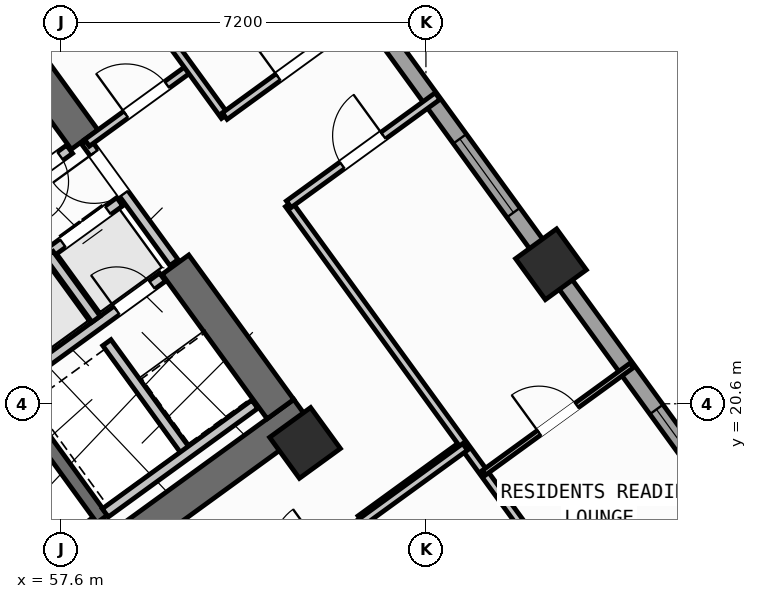
"""IFC4 building model, lengths in metres.
Left out: names, types, materials, properties, quantities, classifications, styles, units other than length and angle.
Written with IfcOpenShell. Run it as: python <this file> out.ifc"""

import sys

from ifc_helpers import new_model, si_unit, direction, frame, frame_2d, origin, origin_2d, place, context, subcontext, project, spatial, rectangle, hollow_rectangle, extrude, source, transform, mapped, element, fill, save


model = new_model("IFC4")
c1 = context("Model", 3, precision=1e-05, world=origin(), true_north=direction((0.0, 1.0)))
c2 = subcontext(c1, "Body", "Model", "MODEL_VIEW")
j1 = project(units=[si_unit("LENGTHUNIT", "METRE"), si_unit("PLANEANGLEUNIT", "RADIAN")], contexts=[c1])
p1 = place(None, origin())
s1 = spatial("IfcSite", under=j1, at=p1, CompositionType="ELEMENT")
p2 = place(p1, origin())
s2 = spatial("IfcBuilding", under=s1, at=p2, CompositionType="ELEMENT")
p3 = place(p2, frame((0.0, 0.0, 31.2)))
s3 = spatial("IfcBuildingStorey", under=s2, at=p3, CompositionType="ELEMENT", Elevation=31.2)
p4 = place(p3, frame((52.318, 13.11, 0.0), z_axis=(0.0, 0.0, 1.0), x_axis=(0.809019445368, 0.587781878776, 0.0)))
e1 = element("IfcWall", 1, at=p4, inside=s3, PredefinedType="SHEAR", context=c2, shape_type="SweptSolid", body=[
    extrude(rectangle(XDim=12.44, YDim=0.65, at=frame_2d((6.22, 0.0))), origin(), (0.0, 0.0, 1.0), 3.35),
])
p5 = place(p3, frame((61.929, 20.494, 0.0), z_axis=(0.0, 0.0, 1.0), x_axis=(-0.58782982593, 0.808984607855, 0.0)))
e2 = element("IfcWall", 2, at=p5, inside=s3, PredefinedType="SHEAR", context=c2, shape_type="SweptSolid", body=[
    extrude(rectangle(XDim=3.525, YDim=0.65, at=frame_2d((1.762, 0.0))), origin(), (0.0, 0.0, 1.0), 3.35),
])
p6 = place(p3, frame((58.064, 25.813, 0.0), z_axis=(0.0, 0.0, 1.0), x_axis=(-0.58777996584, 0.809020835181, 0.0)))
e3 = element("IfcWall", 3, at=p6, inside=s3, PredefinedType="SHEAR", context=c2, shape_type="SweptSolid", body=[
    extrude(rectangle(XDim=6.375, YDim=0.65, at=frame_2d((3.188, 0.0))), origin(), (0.0, 0.0, 1.0), 3.35),
])
m1 = source(origin(), c2, "Body", "SweptSolid", [
    extrude(hollow_rectangle(XDim=1.0, YDim=1.0, WallThickness=0.04, at=origin_2d()), origin(), (0.0, 0.0, 1.0), 3.6),
])
for number, where, z_axis, x_axis in (
    (4, (62.414, 19.827, 0.0), (0.0, 0.0, 1.0), (0.809, 0.588, 0.0)),
    (5, (67.268, 23.354, 0.0), (0.0, 0.0, 1.0), (0.809, 0.588, 0.0)),
):
    element("IfcColumn", number, at=place(p3, frame(where, z_axis=z_axis, x_axis=x_axis)), inside=s3, PredefinedType="COLUMN", context=c2, shape_type="MappedRepresentation", body=[
        mapped(m1, transform((0.0, 0.0, 0.0), scale=1.0)),
    ])
p7 = place(p3, frame((43.938, 25.192, 0.0), z_axis=(0.0, 0.0, 1.0), x_axis=(0.809016324578, 0.587786174187, 0.0)))
e6 = element("IfcWall", 6, at=p7, inside=s3, PredefinedType="STANDARD", context=c2, shape_type="SweptSolid", body=[
    extrude(rectangle(XDim=17.587, YDim=0.32, at=frame_2d((8.794, 0.0))), origin(), (0.0, 0.0, 1.0), 3.35),
])
p8 = place(p7, frame((14.914, 0.0, 0.0)))
e7 = element("IfcOpeningElement", 7, at=p8, cuts=e6, PredefinedType="OPENING", context=c2, shape_type="SweptSolid", body=[
    extrude(rectangle(XDim=1.05, YDim=2.15, at=frame_2d((0.525, 1.075))), frame((0.0, 0.17, 0.0), z_axis=(0.0, -1.0, 0.0), x_axis=(1.0, 0.0, 0.0)), (0.0, 0.0, 1.0), 0.34),
])
p9 = place(p7, frame((2.169, 0.0, 0.8)))
e8 = element("IfcOpeningElement", 8, at=p9, cuts=e6, PredefinedType="OPENING", context=c2, shape_type="SweptSolid", body=[
    extrude(rectangle(XDim=2.1, YDim=1.55, at=frame_2d((1.05, 0.775))), frame((0.0, 0.17, 0.0), z_axis=(0.0, -1.0, 0.0), x_axis=(1.0, 0.0, 0.0)), (0.0, 0.0, 1.0), 0.34),
])
p10 = place(p7, frame((7.319, 0.0, 0.8)))
e9 = element("IfcOpeningElement", 9, at=p10, cuts=e6, PredefinedType="OPENING", context=c2, shape_type="SweptSolid", body=[
    extrude(rectangle(XDim=2.1, YDim=1.55, at=frame_2d((1.05, 0.775))), frame((0.0, 0.17, 0.0), z_axis=(0.0, -1.0, 0.0), x_axis=(1.0, 0.0, 0.0)), (0.0, 0.0, 1.0), 0.34),
])
p11 = place(p3, frame((58.455, 35.484, 0.0), z_axis=(0.0, 0.0, 1.0), x_axis=(0.587783625747, -0.809018176127, 0.0)))
e10 = element("IfcWall", 10, at=p11, inside=s3, PredefinedType="STANDARD", context=c2, shape_type="SweptSolid", body=[
    extrude(rectangle(XDim=21.587, YDim=0.32, at=frame_2d((10.794, 0.0))), origin(), (0.0, 0.0, 1.0), 2.725),
])
p12 = place(p11, frame((2.994, 0.0, 0.8)))
e11 = element("IfcOpeningElement", 11, at=p12, cuts=e10, PredefinedType="OPENING", context=c2, shape_type="SweptSolid", body=[
    extrude(rectangle(XDim=2.1, YDim=1.55, at=frame_2d((1.05, 0.775))), frame((0.0, 0.17, 0.0), z_axis=(0.0, -1.0, 0.0), x_axis=(1.0, 0.0, 0.0)), (0.0, 0.0, 1.0), 0.34),
])
p13 = place(p11, frame((11.934, 0.0, 0.85)))
e12 = element("IfcOpeningElement", 12, at=p13, cuts=e10, PredefinedType="OPENING", context=c2, shape_type="SweptSolid", body=[
    extrude(rectangle(XDim=1.8, YDim=1.5, at=frame_2d((0.9, 0.75))), frame((0.0, 0.17, 0.0), z_axis=(0.0, -1.0, 0.0), x_axis=(1.0, 0.0, 0.0)), (0.0, 0.0, 1.0), 0.34),
])
p14 = place(p11, frame((18.535, 0.0, 0.85)))
e13 = element("IfcOpeningElement", 13, at=p14, cuts=e10, PredefinedType="OPENING", context=c2, shape_type="SweptSolid", body=[
    extrude(rectangle(XDim=1.5, YDim=1.5, at=frame_2d((0.75, 0.75))), frame((0.0, 0.17, 0.0), z_axis=(0.0, -1.0, 0.0), x_axis=(1.0, 0.0, 0.0)), (0.0, 0.0, 1.0), 0.34),
])
p15 = place(p3, frame((52.472, 14.013, 0.0), z_axis=(0.0, 0.0, 1.0), x_axis=(0.809028366311, 0.587769599847, 0.0)))
e14 = element("IfcWall", 14, at=p15, inside=s3, PredefinedType="SHEAR", context=c2, shape_type="SweptSolid", body=[
    extrude(rectangle(XDim=7.33, YDim=0.26, at=frame_2d((3.665, 0.0))), origin(), (0.0, 0.0, 1.0), 3.35),
])
p16 = place(p3, frame((58.41, 18.327, 0.0), z_axis=(0.0, 0.0, 1.0), x_axis=(-0.58776738483, 0.809029975545, 0.0)))
e15 = element("IfcWall", 15, at=p16, inside=s3, PredefinedType="SHEAR", context=c2, shape_type="SweptSolid", body=[
    extrude(rectangle(XDim=3.16, YDim=0.26, at=frame_2d((1.58, 0.0))), origin(), (0.0, 0.0, 1.0), 3.35),
])
p17 = place(p3, frame((56.553, 20.884, 0.0), z_axis=(0.0, 0.0, 1.0), x_axis=(0.809035789462, 0.587759382205, 0.0)))
e16 = element("IfcWall", 16, at=p17, inside=s3, PredefinedType="STANDARD", context=c2, shape_type="SweptSolid", body=[
    extrude(rectangle(XDim=3.768, YDim=0.2, at=frame_2d((1.884, 0.0))), origin(), (0.0, 0.0, 1.0), 3.34),
])
p18 = place(p17, frame((2.65, 0.0, 0.0)))
e17 = element("IfcOpeningElement", 17, at=p18, cuts=e16, PredefinedType="OPENING", context=c2, shape_type="SweptSolid", body=[
    extrude(rectangle(XDim=0.86, YDim=2.05, at=frame_2d((0.43, 1.025))), frame((0.0, 0.11, 0.0), z_axis=(0.0, -1.0, 0.0), x_axis=(1.0, 0.0, 0.0)), (0.0, 0.0, 1.0), 0.22),
])
p19 = place(p3, frame((54.421, 21.436, 0.0), z_axis=(0.0, 0.0, 1.0), x_axis=(0.809013710463, 0.587789772183, 0.0)))
e18 = element("IfcWall", 18, at=p19, inside=s3, PredefinedType="STANDARD", context=c2, shape_type="SweptSolid", body=[
    extrude(rectangle(XDim=5.36, YDim=0.2, at=frame_2d((2.68, 0.0))), origin(), (0.0, 0.0, 1.0), 3.34),
])
p20 = place(p19, frame((0.37, 0.0, 0.0)))
e19 = element("IfcOpeningElement", 19, at=p20, cuts=e18, PredefinedType="OPENING", context=c2, shape_type="SweptSolid", body=[
    extrude(rectangle(XDim=1.1, YDim=2.15, at=frame_2d((0.55, 1.075))), frame((0.0, 0.11, 0.0), z_axis=(0.0, -1.0, 0.0), x_axis=(1.0, 0.0, 0.0)), (0.0, 0.0, 1.0), 0.22),
])
p21 = place(p19, frame((2.17, 0.0, 0.0)))
e20 = element("IfcOpeningElement", 20, at=p21, cuts=e18, PredefinedType="OPENING", context=c2, shape_type="SweptSolid", body=[
    extrude(rectangle(XDim=1.1, YDim=2.15, at=frame_2d((0.55, 1.075))), frame((0.0, 0.11, 0.0), z_axis=(0.0, -1.0, 0.0), x_axis=(1.0, 0.0, 0.0)), (0.0, 0.0, 1.0), 0.22),
])
p22 = place(p19, frame((3.97, 0.0, 0.0)))
e21 = element("IfcOpeningElement", 21, at=p22, cuts=e18, PredefinedType="OPENING", context=c2, shape_type="SweptSolid", body=[
    extrude(rectangle(XDim=1.1, YDim=2.15, at=frame_2d((0.55, 1.075))), frame((0.0, 0.11, 0.0), z_axis=(0.0, -1.0, 0.0), x_axis=(1.0, 0.0, 0.0)), (0.0, 0.0, 1.0), 0.22),
])
p23 = place(p3, frame((58.29, 22.27, 0.0), z_axis=(0.0, 0.0, 1.0), x_axis=(-0.587840865826, 0.808976585857, 0.0)))
e22 = element("IfcWall", 22, at=p23, inside=s3, PredefinedType="STANDARD", context=c2, shape_type="SweptSolid", body=[
    extrude(rectangle(XDim=1.58, YDim=0.2, at=frame_2d((0.79, 0.0))), origin(), (0.0, 0.0, 1.0), 3.34),
])
p24 = place(p3, frame((60.067, 19.655, 0.0), z_axis=(0.0, 0.0, 1.0), x_axis=(-0.587800520745, 0.809005900975, 0.0)))
e23 = element("IfcWall", 23, at=p24, inside=s3, PredefinedType="STANDARD", context=c2, shape_type="SweptSolid", body=[
    extrude(rectangle(XDim=2.66, YDim=0.2, at=frame_2d((1.33, 0.0))), origin(), (0.0, 0.0, 1.0), 3.34),
])
p25 = place(p3, frame((58.472, 18.447, 0.0), z_axis=(0.0, 0.0, 1.0), x_axis=(0.809022487728, 0.587777691266, 0.0)))
e24 = element("IfcWall", 24, at=p25, inside=s3, PredefinedType="STANDARD", context=c2, shape_type="SweptSolid", body=[
    extrude(rectangle(XDim=3.648, YDim=0.2, at=frame_2d((1.824, 0.0))), origin(), (0.0, 0.0, 1.0), 3.34),
])
p26 = place(p3, frame((53.425, 22.468, 0.0), z_axis=(0.0, 0.0, 1.0), x_axis=(0.80902705128, 0.587771409902, 0.0)))
e25 = element("IfcWall", 25, at=p26, inside=s3, PredefinedType="STANDARD", context=c2, shape_type="SweptSolid", body=[
    extrude(rectangle(XDim=5.368, YDim=0.2, at=frame_2d((2.684, 0.0))), origin(), (0.0, 0.0, 1.0), 3.34),
])
p27 = place(p26, frame((4.28, 0.0, 0.0)))
e26 = element("IfcOpeningElement", 26, at=p27, cuts=e25, PredefinedType="OPENING", context=c2, shape_type="SweptSolid", body=[
    extrude(rectangle(XDim=0.86, YDim=2.05, at=frame_2d((0.43, 1.025))), frame((0.0, 0.11, 0.0), z_axis=(0.0, -1.0, 0.0), x_axis=(1.0, 0.0, 0.0)), (0.0, 0.0, 1.0), 0.22),
])
p28 = place(p26, frame((1.45, 0.0, 0.0)))
e27 = element("IfcOpeningElement", 27, at=p28, cuts=e25, PredefinedType="OPENING", context=c2, shape_type="SweptSolid", body=[
    extrude(rectangle(XDim=0.86, YDim=2.05, at=frame_2d((0.43, 1.025))), frame((0.0, 0.11, 0.0), z_axis=(0.0, -1.0, 0.0), x_axis=(1.0, 0.0, 0.0)), (0.0, 0.0, 1.0), 0.22),
])
p29 = place(p3, frame((59.827, 23.386, 0.0), z_axis=(0.0, 0.0, 1.0), x_axis=(-0.587803840107, 0.809003489211, 0.0)))
e28 = element("IfcWall", 28, at=p29, inside=s3, PredefinedType="STANDARD", context=c2, shape_type="SweptSolid", body=[
    extrude(rectangle(XDim=2.96, YDim=0.2, at=frame_2d((1.48, 0.0))), origin(), (0.0, 0.0, 1.0), 3.34),
])
p30 = place(p29, frame((1.68, 0.0, 0.0)))
e29 = element("IfcOpeningElement", 29, at=p30, cuts=e28, PredefinedType="OPENING", context=c2, shape_type="SweptSolid", body=[
    extrude(rectangle(XDim=1.0, YDim=2.1, at=frame_2d((0.5, 1.05))), frame((0.0, 0.11, 0.0), z_axis=(0.0, -1.0, 0.0), x_axis=(1.0, 0.0, 0.0)), (0.0, 0.0, 1.0), 0.22),
])
p31 = place(p3, frame((63.507, 18.322, 0.0), z_axis=(0.0, 0.0, 1.0), x_axis=(0.809034604122, 0.587761013791, 0.0)))
e30 = element("IfcWall", 30, at=p31, inside=s3, PredefinedType="PARTITIONING", context=c2, shape_type="SweptSolid", body=[
    extrude(rectangle(XDim=2.51, YDim=0.16, at=frame_2d((1.255, 0.0))), origin(), (0.0, 0.0, 1.0), 3.34),
])
p32 = place(p3, frame((58.111, 25.749, 0.0), z_axis=(0.0, 0.0, 1.0), x_axis=(0.809000999347, 0.58780726693, 0.0)))
e31 = element("IfcWall", 31, at=p32, inside=s3, PredefinedType="PARTITIONING", context=c2, shape_type="SweptSolid", body=[
    extrude(rectangle(XDim=2.51, YDim=0.16, at=frame_2d((1.255, 0.0))), origin(), (0.0, 0.0, 1.0), 2.725),
])
p33 = place(p32, frame((0.95, 0.0, 0.0)))
e32 = element("IfcOpeningElement", 32, at=p33, cuts=e31, PredefinedType="OPENING", context=c2, shape_type="SweptSolid", body=[
    extrude(rectangle(XDim=1.0, YDim=2.1, at=frame_2d((0.5, 1.05))), frame((0.0, 0.09, 0.0), z_axis=(0.0, -1.0, 0.0), x_axis=(1.0, 0.0, 0.0)), (0.0, 0.0, 1.0), 0.18),
])
p34 = place(p3, frame((68.353, 15.922, 0.0), z_axis=(0.0, 0.0, 1.0), x_axis=(-0.587783168305, 0.809018508476, 0.0)))
e33 = element("IfcWall", 33, at=p34, inside=s3, PredefinedType="PARTITIONING", context=c2, shape_type="SweptSolid", body=[
    extrude(rectangle(XDim=10.65, YDim=0.16, at=frame_2d((5.325, 0.0))), origin(), (0.0, 0.0, 1.0), 3.34),
])
p35 = place(p3, frame((60.829, 26.278, 0.0), z_axis=(0.0, 0.0, 1.0), x_axis=(-0.587781800813, 0.80901950201, 0.0)))
e34 = element("IfcWall", 34, at=p35, inside=s3, PredefinedType="PARTITIONING", context=c2, shape_type="SweptSolid", body=[
    extrude(rectangle(XDim=8.9, YDim=0.16, at=frame_2d((4.45, 0.0))), origin(), (0.0, 0.0, 1.0), 3.34),
])
p36 = place(p3, frame((62.093, 24.538, 0.0), z_axis=(0.0, 0.0, 1.0), x_axis=(0.809035546126, 0.58775971715, 0.0)))
e35 = element("IfcWall", 35, at=p36, inside=s3, PredefinedType="PARTITIONING", context=c2, shape_type="SweptSolid", body=[
    extrude(rectangle(XDim=3.63, YDim=0.16, at=frame_2d((1.815, 0.0))), origin(), (0.0, 0.0, 1.0), 3.34),
])
p37 = place(p36, frame((1.305, 0.0, 0.0)))
e36 = element("IfcOpeningElement", 36, at=p37, cuts=e35, PredefinedType="OPENING", context=c2, shape_type="SweptSolid", body=[
    extrude(rectangle(XDim=1.0, YDim=2.1, at=frame_2d((0.5, 1.05))), frame((0.0, 0.09, 0.0), z_axis=(0.0, -1.0, 0.0), x_axis=(1.0, 0.0, 0.0)), (0.0, 0.0, 1.0), 0.18),
])
p38 = place(p3, frame((60.829, 26.278, 0.0), z_axis=(0.0, 0.0, 1.0), x_axis=(0.809003564202, 0.587803736896, 0.0)))
e37 = element("IfcWall", 37, at=p38, inside=s3, PredefinedType="PARTITIONING", context=c2, shape_type="SweptSolid", body=[
    extrude(rectangle(XDim=3.63, YDim=0.16, at=frame_2d((1.815, 0.0))), origin(), (0.0, 0.0, 1.0), 3.34),
])
p39 = place(p38, frame((1.305, 0.0, 0.0)))
e38 = element("IfcOpeningElement", 38, at=p39, cuts=e37, PredefinedType="OPENING", context=c2, shape_type="SweptSolid", body=[
    extrude(rectangle(XDim=1.0, YDim=2.1, at=frame_2d((0.5, 1.05))), frame((0.0, 0.09, 0.0), z_axis=(0.0, -1.0, 0.0), x_axis=(1.0, 0.0, 0.0)), (0.0, 0.0, 1.0), 0.18),
])
p40 = place(p3, frame((65.944, 19.238, 0.0), z_axis=(0.0, 0.0, 1.0), x_axis=(0.809013833588, 0.587789602718, 0.0)))
e39 = element("IfcWall", 39, at=p40, inside=s3, PredefinedType="PARTITIONING", context=c2, shape_type="SweptSolid", body=[
    extrude(rectangle(XDim=3.61, YDim=0.11, at=frame_2d((1.805, 0.0))), origin(), (0.0, 0.0, 1.0), 3.34),
])
p41 = place(p40, frame((1.345, 0.0, 0.0)))
e40 = element("IfcOpeningElement", 40, at=p41, cuts=e39, PredefinedType="OPENING", context=c2, shape_type="SweptSolid", body=[
    extrude(rectangle(XDim=0.92, YDim=2.08, at=frame_2d((0.46, 1.04))), frame((0.0, 0.065, 0.0), z_axis=(0.0, -1.0, 0.0), x_axis=(1.0, 0.0, 0.0)), (0.0, 0.0, 1.0), 0.13),
])
p42 = place(p3, frame((53.705, 11.126, 0.0), z_axis=(0.0, 0.0, 1.0), x_axis=(0.809014504436, 0.587788679384, 0.0)))
e41 = element("IfcWall", 41, at=p42, inside=s3, PredefinedType="PARTITIONING", context=c2, shape_type="SweptSolid", body=[
    extrude(rectangle(XDim=14.67, YDim=0.16, at=frame_2d((7.335, 0.0))), origin(), (0.0, 0.0, 1.0), 3.34),
])
p43 = place(p42, frame((10.2, 0.0, 0.0)))
e42 = element("IfcOpeningElement", 42, at=p43, cuts=e41, PredefinedType="OPENING", context=c2, shape_type="SweptSolid", body=[
    extrude(rectangle(XDim=1.0, YDim=2.1, at=frame_2d((0.5, 1.05))), frame((0.0, 0.09, 0.0), z_axis=(0.0, -1.0, 0.0), x_axis=(1.0, 0.0, 0.0)), (0.0, 0.0, 1.0), 0.18),
])
m2 = source(origin(), c2, "Body", "SweptSolid", [
    extrude(rectangle(XDim=1.8, YDim=1.5, at=frame_2d((0.9, 0.75))), frame((0.0, 0.03, 0.0), z_axis=(0.0, -1.0, 0.0), x_axis=(1.0, 0.0, 0.0)), (0.0, 0.0, 1.0), 0.06),
])
p44 = place(p13, origin())
e43 = element("IfcWindow", 43, at=p44, inside=s3, PartitioningType="SINGLE_PANEL", PredefinedType="WINDOW", context=c2, shape_type="MappedRepresentation", body=[
    mapped(m2, transform((0.0, 0.0, 0.0), scale=1.0)),
])
fill(e12, e43)
m3 = source(origin(), c2, "Body", "SweptSolid", [
    extrude(rectangle(XDim=1.5, YDim=1.5, at=frame_2d((0.75, 0.75))), frame((0.0, 0.03, 0.0), z_axis=(0.0, -1.0, 0.0), x_axis=(1.0, 0.0, 0.0)), (0.0, 0.0, 1.0), 0.06),
])
p45 = place(p14, origin())
e44 = element("IfcWindow", 44, at=p45, inside=s3, PartitioningType="SINGLE_PANEL", PredefinedType="WINDOW", context=c2, shape_type="MappedRepresentation", body=[
    mapped(m3, transform((0.0, 0.0, 0.0), scale=1.0)),
])
fill(e13, e44)
m4 = source(origin(), c2, "Body", "SweptSolid", [
    extrude(rectangle(XDim=1.1, YDim=2.15, at=frame_2d((0.55, 1.075))), frame((0.0, 0.025, 0.0), z_axis=(0.0, -1.0, 0.0), x_axis=(1.0, 0.0, 0.0)), (0.0, 0.0, 1.0), 0.05),
])
p46 = place(p22, origin())
e45 = element("IfcDoor", 45, at=p46, inside=s3, OperationType="DOUBLE_DOOR_SLIDING", PredefinedType="DOOR", context=c2, shape_type="MappedRepresentation", body=[
    mapped(m4, transform((0.0, 0.0, 0.0), scale=1.0)),
])
fill(e21, e45)
m5 = source(origin(), c2, "Body", "SweptSolid", [
    extrude(rectangle(XDim=0.86, YDim=2.05, at=frame_2d((0.43, 1.025))), frame((0.0, 0.025, 0.0), z_axis=(0.0, -1.0, 0.0), x_axis=(1.0, 0.0, 0.0)), (0.0, 0.0, 1.0), 0.05),
])
p47 = place(p18, origin())
e46 = element("IfcDoor", 46, at=p47, inside=s3, OperationType="SINGLE_SWING_LEFT", PredefinedType="DOOR", context=c2, shape_type="MappedRepresentation", body=[
    mapped(m5, transform((0.0, 0.0, 0.0), scale=1.0)),
])
fill(e17, e46)
p48 = place(p27, frame((0.86, 0.0, 0.0), z_axis=(0.0, 0.0, 1.0), x_axis=(-1.0, 0.0, 0.0)))
e47 = element("IfcDoor", 47, at=p48, inside=s3, OperationType="SINGLE_SWING_RIGHT", PredefinedType="DOOR", context=c2, shape_type="MappedRepresentation", body=[
    mapped(m5, transform((0.0, 0.0, 0.0), scale=1.0)),
])
fill(e26, e47)
m6 = source(origin(), c2, "Body", "SweptSolid", [
    extrude(rectangle(XDim=1.0, YDim=2.1, at=frame_2d((0.5, 1.05))), frame((0.0, 0.025, 0.0), z_axis=(0.0, -1.0, 0.0), x_axis=(1.0, 0.0, 0.0)), (0.0, 0.0, 1.0), 0.05),
])
p49 = place(p33, origin())
e48 = element("IfcDoor", 48, at=p49, inside=s3, OperationType="SINGLE_SWING_LEFT", PredefinedType="DOOR", context=c2, shape_type="MappedRepresentation", body=[
    mapped(m6, transform((0.0, 0.0, 0.0), scale=1.0)),
])
fill(e32, e48)
p50 = place(p30, origin())
e49 = element("IfcDoor", 49, at=p50, inside=s3, OperationType="SINGLE_SWING_RIGHT", PredefinedType="DOOR", context=c2, shape_type="MappedRepresentation", body=[
    mapped(m6, transform((0.0, 0.0, 0.0), scale=1.0)),
])
fill(e29, e49)
p51 = place(p39, origin())
e50 = element("IfcDoor", 50, at=p51, inside=s3, OperationType="SINGLE_SWING_LEFT", PredefinedType="DOOR", context=c2, shape_type="MappedRepresentation", body=[
    mapped(m6, transform((0.0, 0.0, 0.0), scale=1.0)),
])
fill(e38, e50)
p52 = place(p37, origin())
e51 = element("IfcDoor", 51, at=p52, inside=s3, OperationType="SINGLE_SWING_RIGHT", PredefinedType="DOOR", context=c2, shape_type="MappedRepresentation", body=[
    mapped(m6, transform((0.0, 0.0, 0.0), scale=1.0)),
])
fill(e36, e51)
m7 = source(origin(), c2, "Body", "SweptSolid", [
    extrude(rectangle(XDim=0.92, YDim=2.08, at=frame_2d((0.46, 1.04))), frame((0.0, 0.025, 0.0), z_axis=(0.0, -1.0, 0.0), x_axis=(1.0, 0.0, 0.0)), (0.0, 0.0, 1.0), 0.05),
])
p53 = place(p41, origin())
e52 = element("IfcDoor", 52, at=p53, inside=s3, OperationType="SINGLE_SWING_LEFT", PredefinedType="DOOR", context=c2, shape_type="MappedRepresentation", body=[
    mapped(m7, transform((0.0, 0.0, 0.0), scale=1.0)),
])
fill(e40, e52)
save(model, sys.argv[1])
